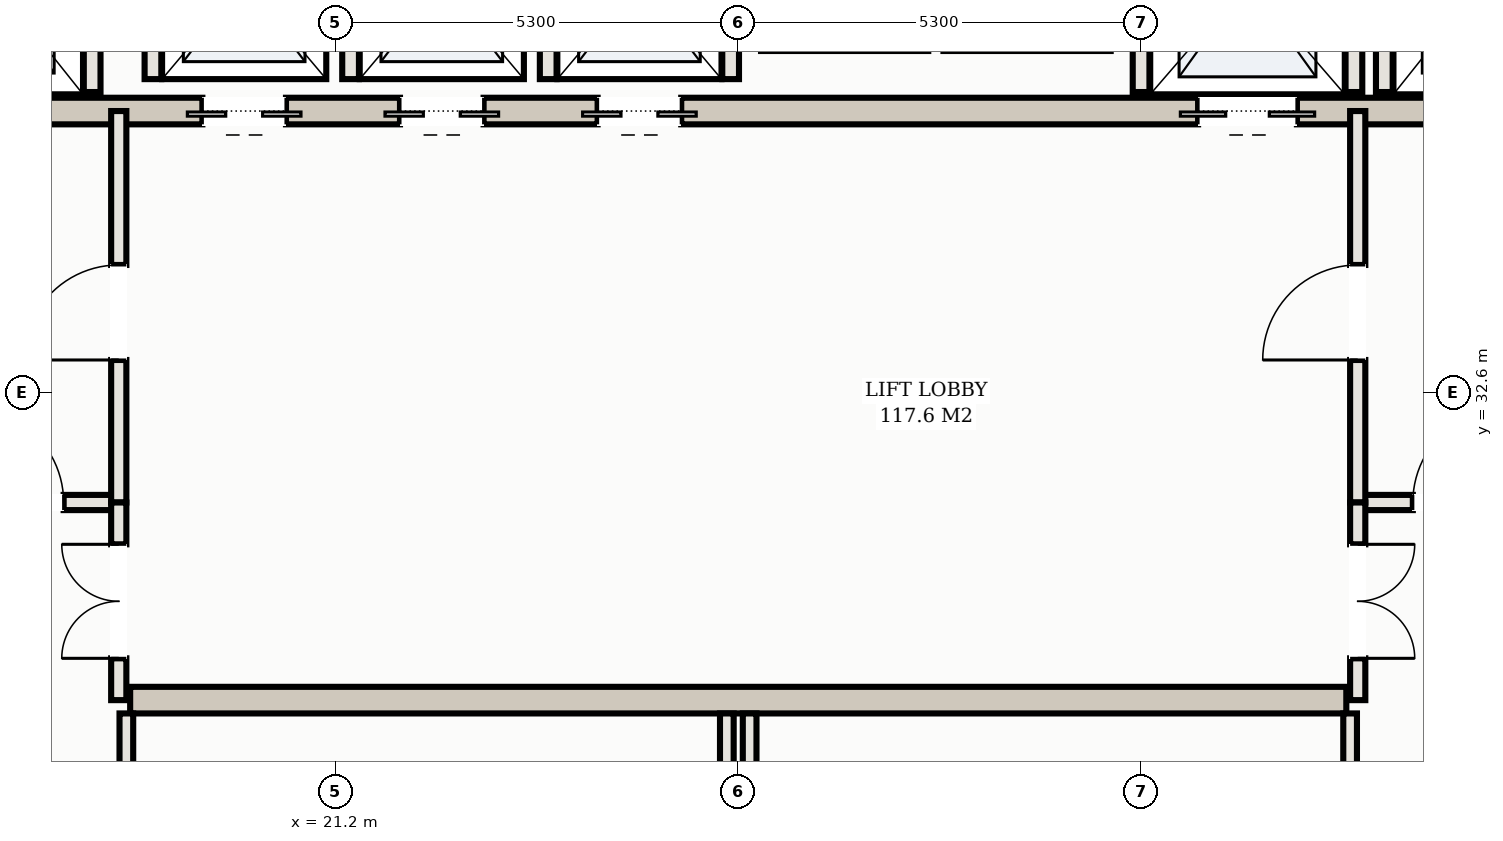
"""IFC4 building model, lengths in metres.
Left out: names, types, materials, properties, quantities, classifications, styles, units other than length and angle.
Written with IfcOpenShell. Run it as: python <this file> out.ifc"""

import sys

from ifc_helpers import new_model, si_unit, direction, frame, frame_2d, origin, place, context, subcontext, project, spatial, rectangle, extrude, element, fill, save


model = new_model("IFC4")
c1 = context("Model", 3, precision=1e-05, world=origin(), true_north=direction((0.0, 1.0)))
c2 = subcontext(c1, "Body", "Model", "MODEL_VIEW")
j1 = project(units=[si_unit("LENGTHUNIT", "METRE"), si_unit("PLANEANGLEUNIT", "RADIAN")], contexts=[c1])
p1 = place(None, origin())
s1 = spatial("IfcSite", under=j1, at=p1, CompositionType="ELEMENT")
p2 = place(p1, origin())
s2 = spatial("IfcBuilding", under=s1, at=p2, CompositionType="ELEMENT")
p3 = place(p2, frame((0.0, 0.0, 239.6)))
s3 = spatial("IfcBuildingStorey", under=s2, at=p3, CompositionType="ELEMENT", Elevation=239.6)
p4 = place(p3, frame((15.5, 36.3, 0.0), z_axis=(0.0, 0.0, 1.0), x_axis=(1.0, 0.0, 0.0)))
e1 = element("IfcWall", 1, at=p4, inside=s3, PredefinedType="SHEAR", context=c2, shape_type="SweptSolid", body=[
    extrude(rectangle(XDim=22.0, YDim=0.35, at=frame_2d((11.0, 0.0))), origin(), (0.0, 0.0, 1.0), 3.11),
])
p5 = place(p4, frame((0.65, 0.0, 0.0)))
e2 = element("IfcOpeningElement", 2, at=p5, cuts=e1, PredefinedType="OPENING", context=c2, shape_type="SweptSolid", body=[
    extrude(rectangle(XDim=1.1, YDim=2.15, at=frame_2d((0.55, 1.075))), frame((0.0, 0.185, 0.0), z_axis=(0.0, -1.0, 0.0), x_axis=(1.0, 0.0, 0.0)), (0.0, 0.0, 1.0), 0.37),
])
p6 = place(p4, frame((20.25, 0.0, 0.0)))
e3 = element("IfcOpeningElement", 3, at=p6, cuts=e1, PredefinedType="OPENING", context=c2, shape_type="SweptSolid", body=[
    extrude(rectangle(XDim=1.1, YDim=2.15, at=frame_2d((0.55, 1.075))), frame((0.0, 0.185, 0.0), z_axis=(0.0, -1.0, 0.0), x_axis=(1.0, 0.0, 0.0)), (0.0, 0.0, 1.0), 0.37),
])
p7 = place(p4, frame((17.05, 0.0, 0.0)))
e4 = element("IfcOpeningElement", 4, at=p7, cuts=e1, PredefinedType="OPENING", context=c2, shape_type="SweptSolid", body=[
    extrude(rectangle(XDim=1.3, YDim=2.2, at=frame_2d((0.65, 1.1))), frame((0.0, 0.185, 0.0), z_axis=(0.0, -1.0, 0.0), x_axis=(1.0, 0.0, 0.0)), (0.0, 0.0, 1.0), 0.37),
])
p8 = place(p4, frame((3.95, 0.0, 0.0)))
e5 = element("IfcOpeningElement", 5, at=p8, cuts=e1, PredefinedType="OPENING", context=c2, shape_type="SweptSolid", body=[
    extrude(rectangle(XDim=1.1, YDim=2.15, at=frame_2d((0.55, 1.075))), frame((0.0, 0.185, 0.0), z_axis=(0.0, -1.0, 0.0), x_axis=(1.0, 0.0, 0.0)), (0.0, 0.0, 1.0), 0.37),
])
p9 = place(p4, frame((6.55, 0.0, 0.0)))
e6 = element("IfcOpeningElement", 6, at=p9, cuts=e1, PredefinedType="OPENING", context=c2, shape_type="SweptSolid", body=[
    extrude(rectangle(XDim=1.1, YDim=2.15, at=frame_2d((0.55, 1.075))), frame((0.0, 0.185, 0.0), z_axis=(0.0, -1.0, 0.0), x_axis=(1.0, 0.0, 0.0)), (0.0, 0.0, 1.0), 0.37),
])
p10 = place(p4, frame((9.15, 0.0, 0.0)))
e7 = element("IfcOpeningElement", 7, at=p10, cuts=e1, PredefinedType="OPENING", context=c2, shape_type="SweptSolid", body=[
    extrude(rectangle(XDim=1.1, YDim=2.15, at=frame_2d((0.55, 1.075))), frame((0.0, 0.185, 0.0), z_axis=(0.0, -1.0, 0.0), x_axis=(1.0, 0.0, 0.0)), (0.0, 0.0, 1.0), 0.37),
])
p11 = place(p3, frame((18.5, 28.55, 0.0), z_axis=(0.0, 0.0, 1.0), x_axis=(1.0, 0.0, 0.0)))
e8 = element("IfcWall", 8, at=p11, inside=s3, PredefinedType="SHEAR", context=c2, shape_type="SweptSolid", body=[
    extrude(rectangle(XDim=16.0, YDim=0.35, at=frame_2d((8.0, 0.0))), origin(), (0.0, 0.0, 1.0), 3.11),
])
for number, where, z_axis, x_axis in (
    (9, (18.0, 36.55, 0.0), (0.0, 0.0, 1.0), (0.0, 1.0, 0.0)),
    (10, (35.0, 36.55, 0.0), (0.0, 0.0, 1.0), (0.0, 1.0, 0.0)),
    (11, (31.8, 36.55, 0.0), (0.0, 0.0, 1.0), (0.0, 1.0, 0.0)),
    (12, (34.6, 36.55, 0.0), (0.0, 0.0, 1.0), (0.0, 1.0, 0.0)),
):
    element("IfcWall", number, at=place(p3, frame(where, z_axis=z_axis, x_axis=x_axis)), inside=s3, PredefinedType="SOLIDWALL", context=c2, shape_type="SweptSolid", body=[
        extrude(rectangle(XDim=2.93, YDim=0.22, at=frame_2d((1.465, 0.0))), origin(), (0.0, 0.0, 1.0), 3.11),
    ])
for number, where, z_axis, x_axis in (
    (13, (18.8, 36.72, 0.0), (0.0, 0.0, 1.0), (0.0, 1.0, 0.0)),
    (14, (21.4, 36.72, 0.0), (0.0, 0.0, 1.0), (0.0, 1.0, 0.0)),
    (15, (24.0, 36.72, 0.0), (0.0, 0.0, 1.0), (0.0, 1.0, 0.0)),
    (16, (26.4, 36.72, 0.0), (0.0, 0.0, 1.0), (0.0, 1.0, 0.0)),
):
    element("IfcWall", number, at=place(p3, frame(where, z_axis=z_axis, x_axis=x_axis)), inside=s3, PredefinedType="SOLIDWALL", context=c2, shape_type="SweptSolid", body=[
        extrude(rectangle(XDim=2.56, YDim=0.22, at=frame_2d((1.28, 0.0))), origin(), (0.0, 0.0, 1.0), 3.11),
    ])
p12 = place(p3, frame((15.1, 31.15, 0.0), z_axis=(0.0, 0.0, 1.0), x_axis=(1.0, 0.0, 0.0)))
e17 = element("IfcWall", 17, at=p12, inside=s3, PredefinedType="PARTITIONING", context=c2, shape_type="SweptSolid", body=[
    extrude(rectangle(XDim=3.25, YDim=0.2, at=frame_2d((1.625, 0.0))), origin(), (0.0, 0.0, 1.0), 2.45),
])
p13 = place(p12, frame((1.275, 0.0, 0.0)))
e18 = element("IfcOpeningElement", 18, at=p13, cuts=e17, PredefinedType="OPENING", context=c2, shape_type="SweptSolid", body=[
    extrude(rectangle(XDim=1.25, YDim=2.2, at=frame_2d((0.625, 1.1))), frame((0.0, 0.11, 0.0), z_axis=(0.0, -1.0, 0.0), x_axis=(1.0, 0.0, 0.0)), (0.0, 0.0, 1.0), 0.22),
])
p14 = place(p3, frame((18.35, 31.15, 0.0), z_axis=(0.0, 0.0, 1.0), x_axis=(0.0, 1.0, 0.0)))
e19 = element("IfcWall", 19, at=p14, inside=s3, PredefinedType="PARTITIONING", context=c2, shape_type="SweptSolid", body=[
    extrude(rectangle(XDim=5.15, YDim=0.2, at=frame_2d((2.575, 0.0))), origin(), (0.0, 0.0, 1.0), 2.45),
])
p15 = place(p14, frame((1.875, 0.0, 0.0)))
e20 = element("IfcOpeningElement", 20, at=p15, cuts=e19, PredefinedType="OPENING", context=c2, shape_type="SweptSolid", body=[
    extrude(rectangle(XDim=1.25, YDim=2.2, at=frame_2d((0.625, 1.1))), frame((0.0, 0.11, 0.0), z_axis=(0.0, -1.0, 0.0), x_axis=(1.0, 0.0, 0.0)), (0.0, 0.0, 1.0), 0.22),
])
p16 = place(p3, frame((34.65, 31.15, 0.0), z_axis=(0.0, 0.0, 1.0), x_axis=(1.0, 0.0, 0.0)))
e21 = element("IfcWall", 21, at=p16, inside=s3, PredefinedType="PARTITIONING", context=c2, shape_type="SweptSolid", body=[
    extrude(rectangle(XDim=3.25, YDim=0.2, at=frame_2d((1.625, 0.0))), origin(), (0.0, 0.0, 1.0), 2.45),
])
p17 = place(p16, frame((0.725, 0.0, 0.0)))
e22 = element("IfcOpeningElement", 22, at=p17, cuts=e21, PredefinedType="OPENING", context=c2, shape_type="SweptSolid", body=[
    extrude(rectangle(XDim=1.25, YDim=2.2, at=frame_2d((0.625, 1.1))), frame((0.0, 0.11, 0.0), z_axis=(0.0, -1.0, 0.0), x_axis=(1.0, 0.0, 0.0)), (0.0, 0.0, 1.0), 0.22),
])
p18 = place(p3, frame((34.65, 31.15, 0.0), z_axis=(0.0, 0.0, 1.0), x_axis=(0.0, 1.0, 0.0)))
e23 = element("IfcWall", 23, at=p18, inside=s3, PredefinedType="PARTITIONING", context=c2, shape_type="SweptSolid", body=[
    extrude(rectangle(XDim=5.15, YDim=0.2, at=frame_2d((2.575, 0.0))), origin(), (0.0, 0.0, 1.0), 2.45),
])
p19 = place(p18, frame((1.875, 0.0, 0.0)))
e24 = element("IfcOpeningElement", 24, at=p19, cuts=e23, PredefinedType="OPENING", context=c2, shape_type="SweptSolid", body=[
    extrude(rectangle(XDim=1.25, YDim=2.2, at=frame_2d((0.625, 1.1))), frame((0.0, 0.11, 0.0), z_axis=(0.0, -1.0, 0.0), x_axis=(1.0, 0.0, 0.0)), (0.0, 0.0, 1.0), 0.22),
])
p20 = place(p3, frame((18.35, 28.55, 0.0), z_axis=(0.0, 0.0, 1.0), x_axis=(0.0, 1.0, 0.0)))
e25 = element("IfcWall", 25, at=p20, inside=s3, PredefinedType="PARTITIONING", context=c2, shape_type="SweptSolid", body=[
    extrude(rectangle(XDim=2.6, YDim=0.2, at=frame_2d((1.3, 0.0))), origin(), (0.0, 0.0, 1.0), 2.45),
])
p21 = place(p20, frame((0.55, 0.0, 0.0)))
e26 = element("IfcOpeningElement", 26, at=p21, cuts=e25, PredefinedType="OPENING", context=c2, shape_type="SweptSolid", body=[
    extrude(rectangle(XDim=1.5, YDim=2.25, at=frame_2d((0.75, 1.125))), frame((0.0, 0.11, 0.0), z_axis=(0.0, -1.0, 0.0), x_axis=(1.0, 0.0, 0.0)), (0.0, 0.0, 1.0), 0.22),
])
p22 = place(p3, frame((34.65, 28.55, 0.0), z_axis=(0.0, 0.0, 1.0), x_axis=(0.0, 1.0, 0.0)))
e27 = element("IfcWall", 27, at=p22, inside=s3, PredefinedType="PARTITIONING", context=c2, shape_type="SweptSolid", body=[
    extrude(rectangle(XDim=2.6, YDim=0.2, at=frame_2d((1.3, 0.0))), origin(), (0.0, 0.0, 1.0), 2.45),
])
p23 = place(p22, frame((0.55, 0.0, 0.0)))
e28 = element("IfcOpeningElement", 28, at=p23, cuts=e27, PredefinedType="OPENING", context=c2, shape_type="SweptSolid", body=[
    extrude(rectangle(XDim=1.5, YDim=2.25, at=frame_2d((0.75, 1.125))), frame((0.0, 0.11, 0.0), z_axis=(0.0, -1.0, 0.0), x_axis=(1.0, 0.0, 0.0)), (0.0, 0.0, 1.0), 0.22),
])
for number, where, z_axis, x_axis in (
    (29, (18.45, 25.62, 0.0), (0.0, 0.0, 1.0), (0.0, 1.0, 0.0)),
    (30, (26.35, 25.62, 0.0), (0.0, 0.0, 1.0), (0.0, 1.0, 0.0)),
    (31, (26.65, 25.62, 0.0), (0.0, 0.0, 1.0), (0.0, 1.0, 0.0)),
    (32, (34.55, 25.62, 0.0), (0.0, 0.0, 1.0), (0.0, 1.0, 0.0)),
):
    element("IfcWall", number, at=place(p3, frame(where, z_axis=z_axis, x_axis=x_axis)), inside=s3, PredefinedType="PARTITIONING", context=c2, shape_type="SweptSolid", body=[
        extrude(rectangle(XDim=2.755, YDim=0.18, at=frame_2d((1.377, 0.0))), origin(), (0.0, 0.0, 1.0), 2.45),
    ])
p24 = place(p7, frame((1.3, 0.0, 0.0), z_axis=(0.0, 0.0, 1.0), x_axis=(-1.0, 0.0, 0.0)))
e33 = element("IfcDoor", 33, at=p24, inside=s3, OperationType="DOUBLE_DOOR_SLIDING", PredefinedType="DOOR", context=c2, shape_type="SweptSolid", body=[
    extrude(rectangle(XDim=1.3, YDim=2.2, at=frame_2d((0.65, 1.1))), frame((0.0, 0.025, 0.0), z_axis=(0.0, -1.0, 0.0), x_axis=(1.0, 0.0, 0.0)), (0.0, 0.0, 1.0), 0.05),
])
fill(e4, e33)
p25 = place(p8, frame((1.1, 0.0, 0.0), z_axis=(0.0, 0.0, 1.0), x_axis=(-1.0, 0.0, 0.0)))
e34 = element("IfcDoor", 34, at=p25, inside=s3, OperationType="DOUBLE_DOOR_SLIDING", PredefinedType="DOOR", context=c2, shape_type="SweptSolid", body=[
    extrude(rectangle(XDim=1.1, YDim=2.15, at=frame_2d((0.55, 1.075))), frame((0.0, 0.025, 0.0), z_axis=(0.0, -1.0, 0.0), x_axis=(1.0, 0.0, 0.0)), (0.0, 0.0, 1.0), 0.05),
])
fill(e5, e34)
p26 = place(p9, frame((1.1, 0.0, 0.0), z_axis=(0.0, 0.0, 1.0), x_axis=(-1.0, 0.0, 0.0)))
e35 = element("IfcDoor", 35, at=p26, inside=s3, OperationType="DOUBLE_DOOR_SLIDING", PredefinedType="DOOR", context=c2, shape_type="SweptSolid", body=[
    extrude(rectangle(XDim=1.1, YDim=2.15, at=frame_2d((0.55, 1.075))), frame((0.0, 0.025, 0.0), z_axis=(0.0, -1.0, 0.0), x_axis=(1.0, 0.0, 0.0)), (0.0, 0.0, 1.0), 0.05),
])
fill(e6, e35)
p27 = place(p10, frame((1.1, 0.0, 0.0), z_axis=(0.0, 0.0, 1.0), x_axis=(-1.0, 0.0, 0.0)))
e36 = element("IfcDoor", 36, at=p27, inside=s3, OperationType="DOUBLE_DOOR_SLIDING", PredefinedType="DOOR", context=c2, shape_type="SweptSolid", body=[
    extrude(rectangle(XDim=1.1, YDim=2.15, at=frame_2d((0.55, 1.075))), frame((0.0, 0.025, 0.0), z_axis=(0.0, -1.0, 0.0), x_axis=(1.0, 0.0, 0.0)), (0.0, 0.0, 1.0), 0.05),
])
fill(e7, e36)
p28 = place(p13, origin())
e37 = element("IfcDoor", 37, at=p28, inside=s3, OperationType="SINGLE_SWING_LEFT", PredefinedType="DOOR", context=c2, shape_type="SweptSolid", body=[
    extrude(rectangle(XDim=1.25, YDim=2.2, at=frame_2d((0.625, 1.1))), frame((0.0, 0.025, 0.0), z_axis=(0.0, -1.0, 0.0), x_axis=(1.0, 0.0, 0.0)), (0.0, 0.0, 1.0), 0.05),
])
fill(e18, e37)
p29 = place(p15, origin())
e38 = element("IfcDoor", 38, at=p29, inside=s3, OperationType="SINGLE_SWING_LEFT", PredefinedType="DOOR", context=c2, shape_type="SweptSolid", body=[
    extrude(rectangle(XDim=1.25, YDim=2.2, at=frame_2d((0.625, 1.1))), frame((0.0, 0.025, 0.0), z_axis=(0.0, -1.0, 0.0), x_axis=(1.0, 0.0, 0.0)), (0.0, 0.0, 1.0), 0.05),
])
fill(e20, e38)
p30 = place(p17, origin())
e39 = element("IfcDoor", 39, at=p30, inside=s3, OperationType="SINGLE_SWING_RIGHT", PredefinedType="DOOR", context=c2, shape_type="SweptSolid", body=[
    extrude(rectangle(XDim=1.25, YDim=2.2, at=frame_2d((0.625, 1.1))), frame((0.0, 0.025, 0.0), z_axis=(0.0, -1.0, 0.0), x_axis=(1.0, 0.0, 0.0)), (0.0, 0.0, 1.0), 0.05),
])
fill(e22, e39)
p31 = place(p19, origin())
e40 = element("IfcDoor", 40, at=p31, inside=s3, OperationType="SINGLE_SWING_LEFT", PredefinedType="DOOR", context=c2, shape_type="SweptSolid", body=[
    extrude(rectangle(XDim=1.25, YDim=2.2, at=frame_2d((0.625, 1.1))), frame((0.0, 0.025, 0.0), z_axis=(0.0, -1.0, 0.0), x_axis=(1.0, 0.0, 0.0)), (0.0, 0.0, 1.0), 0.05),
])
fill(e24, e40)
p32 = place(p21, origin())
e41 = element("IfcDoor", 41, at=p32, inside=s3, OperationType="DOUBLE_DOOR_SINGLE_SWING", PredefinedType="DOOR", context=c2, shape_type="SweptSolid", body=[
    extrude(rectangle(XDim=1.5, YDim=2.25, at=frame_2d((0.75, 1.125))), frame((0.0, 0.025, 0.0), z_axis=(0.0, -1.0, 0.0), x_axis=(1.0, 0.0, 0.0)), (0.0, 0.0, 1.0), 0.05),
])
fill(e26, e41)
p33 = place(p23, frame((1.5, 0.0, 0.0), z_axis=(0.0, 0.0, 1.0), x_axis=(-1.0, 0.0, 0.0)))
e42 = element("IfcDoor", 42, at=p33, inside=s3, OperationType="DOUBLE_DOOR_SINGLE_SWING", PredefinedType="DOOR", context=c2, shape_type="SweptSolid", body=[
    extrude(rectangle(XDim=1.5, YDim=2.25, at=frame_2d((0.75, 1.125))), frame((0.0, 0.025, 0.0), z_axis=(0.0, -1.0, 0.0), x_axis=(1.0, 0.0, 0.0)), (0.0, 0.0, 1.0), 0.05),
])
fill(e28, e42)
save(model, sys.argv[1])
